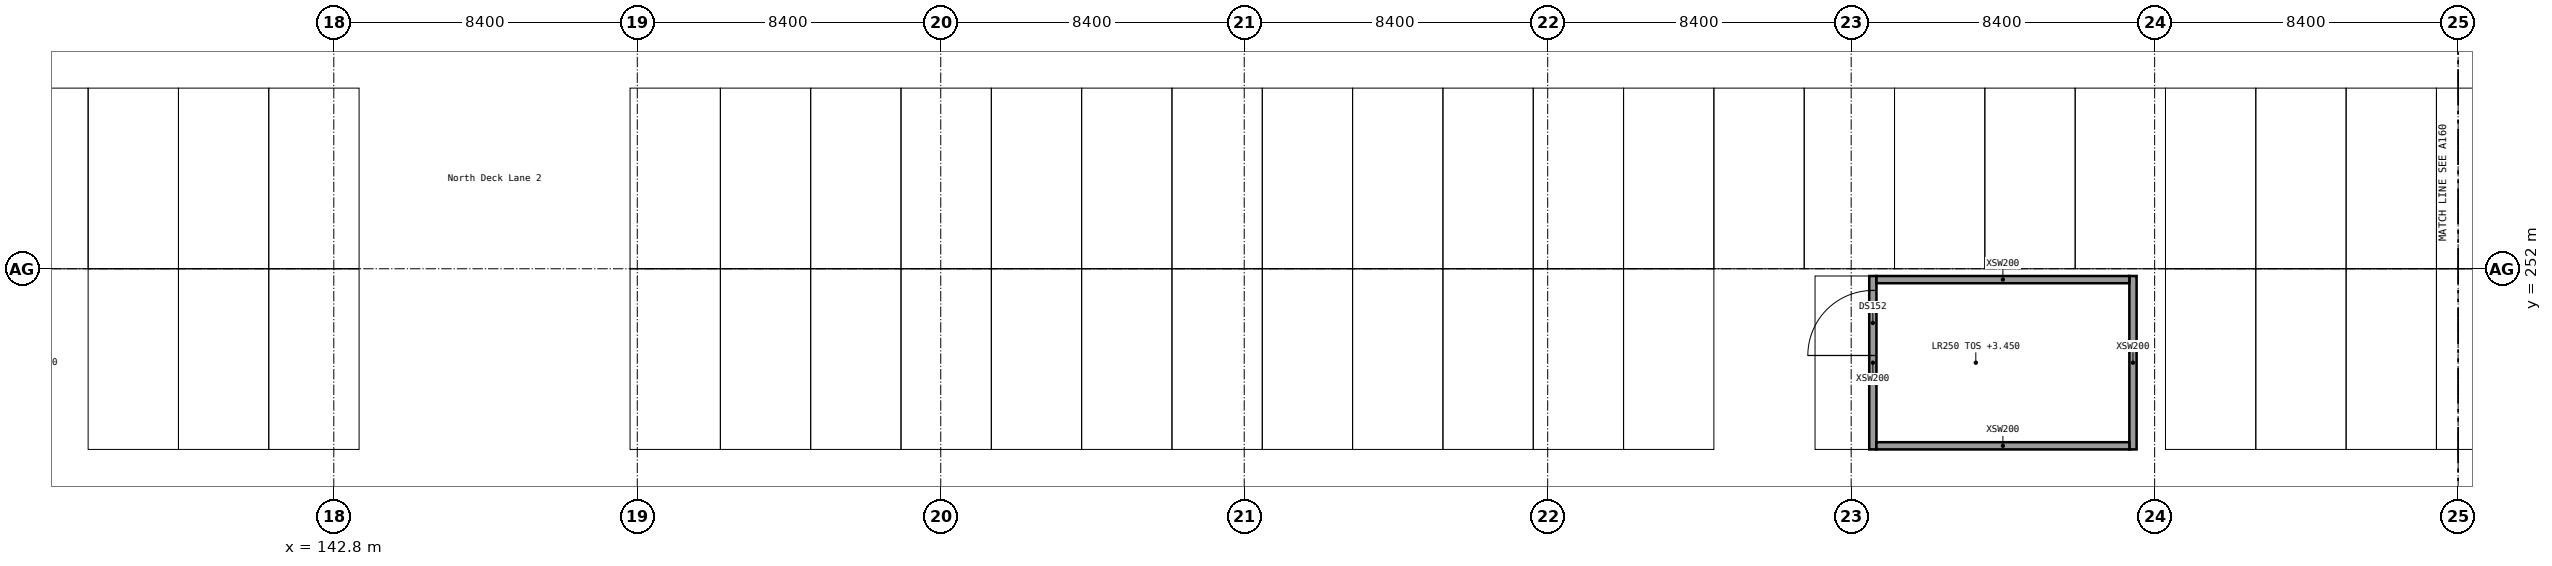
"""IFC4 building model, lengths in metres.
Left out: names, types, materials, properties, quantities, classifications, styles, units other than length and angle.
Written with IfcOpenShell. Run it as: python <this file> out.ifc"""

import sys

from ifc_helpers import new_model, si_unit, direction, frame, frame_2d, origin, place, context, subcontext, project, spatial, rectangle, extrude, element, fill, save


model = new_model("IFC4")
c1 = context("Model", 3, precision=1e-05, world=origin(), true_north=direction((0.0, 1.0)))
c2 = subcontext(c1, "Body", "Model", "MODEL_VIEW")
j1 = project(units=[si_unit("LENGTHUNIT", "METRE"), si_unit("PLANEANGLEUNIT", "RADIAN")], contexts=[c1])
p1 = place(None, origin())
s1 = spatial("IfcSite", under=j1, at=p1, CompositionType="ELEMENT")
p2 = place(p1, origin())
s2 = spatial("IfcBuilding", under=s1, at=p2, CompositionType="ELEMENT")
p3 = place(p2, origin())
s3 = spatial("IfcBuildingStorey", under=s2, at=p3, CompositionType="ELEMENT", Elevation=0.0)
p4 = place(p3, frame((185.4, 247.0, 0.0), z_axis=(0.0, 0.0, 1.0), x_axis=(0.0, 1.0, 0.0)))
e1 = element("IfcWall", 1, at=p4, inside=s3, PredefinedType="SOLIDWALL", context=c2, shape_type="SweptSolid", body=[
    extrude(rectangle(XDim=4.8, YDim=0.2, at=frame_2d((2.4, 0.0))), origin(), (0.0, 0.0, 1.0), 3.2),
])
p5 = place(p4, frame((2.6, 0.0, 0.0)))
e2 = element("IfcOpeningElement", 2, at=p5, cuts=e1, PredefinedType="OPENING", context=c2, shape_type="SweptSolid", body=[
    extrude(rectangle(XDim=1.8, YDim=2.1, at=frame_2d((0.9, 1.05))), frame((0.0, 0.1, 0.0), z_axis=(0.0, -1.0, 0.0), x_axis=(1.0, 0.0, 0.0)), (0.0, 0.0, 1.0), 0.2),
])
p6 = place(p3, frame((192.6, 247.0, 0.0), z_axis=(0.0, 0.0, 1.0), x_axis=(0.0, 1.0, 0.0)))
e3 = element("IfcWall", 3, at=p6, inside=s3, PredefinedType="SOLIDWALL", context=c2, shape_type="SweptSolid", body=[
    extrude(rectangle(XDim=4.8, YDim=0.2, at=frame_2d((2.4, 0.0))), origin(), (0.0, 0.0, 1.0), 3.2),
])
for number, where, z_axis, x_axis in (
    (4, (185.5, 247.1, 0.0), (0.0, 0.0, 1.0), (1.0, 0.0, 0.0)),
    (5, (185.5, 251.7, 0.0), (0.0, 0.0, 1.0), (1.0, 0.0, 0.0)),
):
    element("IfcWall", number, at=place(p3, frame(where, z_axis=z_axis, x_axis=x_axis)), inside=s3, PredefinedType="SOLIDWALL", context=c2, shape_type="SweptSolid", body=[
        extrude(rectangle(XDim=7.0, YDim=0.2, at=frame_2d((3.5, 0.0))), origin(), (0.0, 0.0, 1.0), 3.2),
    ])
p7 = place(p5, origin())
e6 = element("IfcDoor", 6, at=p7, inside=s3, OperationType="SINGLE_SWING_LEFT", PredefinedType="DOOR", context=c2, shape_type="SweptSolid", body=[
    extrude(rectangle(XDim=1.8, YDim=2.1, at=frame_2d((0.9, 1.05))), frame((0.0, 0.025, 0.0), z_axis=(0.0, -1.0, 0.0), x_axis=(1.0, 0.0, 0.0)), (0.0, 0.0, 1.0), 0.05),
])
fill(e2, e6)
save(model, sys.argv[1])
